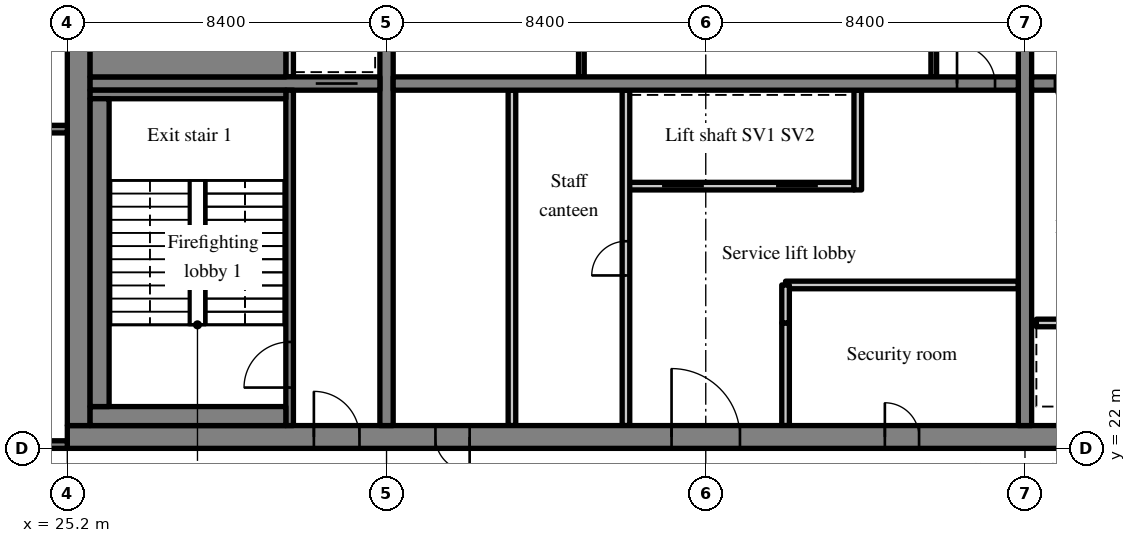
"""IFC4 building model, lengths in metres.
Left out: names, types, materials, properties, quantities, classifications, styles, units other than length and angle.
Written with IfcOpenShell. Run it as: python <this file> out.ifc"""

import sys

from ifc_helpers import new_model, si_unit, direction, frame, frame_2d, origin, place, context, subcontext, project, spatial, rectangle, extrude, source, transform, mapped, element, fill, save


model = new_model("IFC4")
c1 = context("Model", 3, precision=1e-05, world=origin(), true_north=direction((0.0, 1.0)))
c2 = subcontext(c1, "Body", "Model", "MODEL_VIEW")
j1 = project(units=[si_unit("LENGTHUNIT", "METRE"), si_unit("PLANEANGLEUNIT", "RADIAN")], contexts=[c1])
p1 = place(None, origin())
s1 = spatial("IfcSite", under=j1, at=p1, CompositionType="ELEMENT")
p2 = place(p1, origin())
s2 = spatial("IfcBuilding", under=s1, at=p2, CompositionType="ELEMENT")
p3 = place(p2, frame((0.0, 0.0, 214.0)))
s3 = spatial("IfcBuildingStorey", under=s2, at=p3, CompositionType="ELEMENT", Elevation=214.0)
m1 = source(origin(), c2, "Body", "SweptSolid", [
    extrude(rectangle(XDim=50.4, YDim=0.6, at=frame_2d((25.2, 0.0))), origin(), (0.0, 0.0, 1.0), 3.62),
])
p4 = place(p3, frame((25.2, 22.3, 0.0), z_axis=(0.0, 0.0, 1.0), x_axis=(1.0, 0.0, 0.0)))
e1 = element("IfcWall", 1, at=p4, inside=s3, PredefinedType="SHEAR", context=c2, shape_type="MappedRepresentation", body=[
    mapped(m1, transform((0.0, 0.0, 0.0), scale=1.0)),
])
m2 = source(origin(), c2, "Body", "SweptSolid", [
    extrude(rectangle(XDim=1.8, YDim=2.1, at=frame_2d((0.9, 1.05))), frame((0.0, 0.31, 0.0), z_axis=(0.0, -1.0, 0.0), x_axis=(1.0, 0.0, 0.0)), (0.0, 0.0, 1.0), 0.62),
])
p5 = place(p4, frame((15.9, 0.0, 0.0)))
e2 = element("IfcOpeningElement", 2, at=p5, cuts=e1, PredefinedType="OPENING", context=c2, shape_type="MappedRepresentation", body=[
    mapped(m2, transform((0.0, 0.0, 0.0), scale=1.0)),
])
m3 = source(origin(), c2, "Body", "SweptSolid", [
    extrude(rectangle(XDim=0.9, YDim=2.1, at=frame_2d((0.45, 1.05))), frame((0.0, 0.31, 0.0), z_axis=(0.0, -1.0, 0.0), x_axis=(1.0, 0.0, 0.0)), (0.0, 0.0, 1.0), 0.62),
])
p6 = place(p4, frame((9.687, 0.0, 0.0)))
e3 = element("IfcOpeningElement", 3, at=p6, cuts=e1, PredefinedType="OPENING", context=c2, shape_type="MappedRepresentation", body=[
    mapped(m3, transform((0.0, 0.0, 0.0), scale=1.0)),
])
p7 = place(p4, frame((21.513, 0.0, 0.0)))
e4 = element("IfcOpeningElement", 4, at=p7, cuts=e1, PredefinedType="OPENING", context=c2, shape_type="MappedRepresentation", body=[
    mapped(m3, transform((0.0, 0.0, 0.0), scale=1.0)),
])
p8 = place(p4, frame((32.7, 0.0, 0.0)))
e5 = element("IfcOpeningElement", 5, at=p8, cuts=e1, PredefinedType="OPENING", context=c2, shape_type="MappedRepresentation", body=[
    mapped(m2, transform((0.0, 0.0, 0.0), scale=1.0)),
])
m4 = source(origin(), c2, "Body", "SweptSolid", [
    extrude(rectangle(XDim=1.2, YDim=2.1, at=frame_2d((0.6, 1.05))), frame((0.0, 0.31, 0.0), z_axis=(0.0, -1.0, 0.0), x_axis=(1.0, 0.0, 0.0)), (0.0, 0.0, 1.0), 0.62),
])
p9 = place(p4, frame((6.488, 0.0, 0.0)))
e6 = element("IfcOpeningElement", 6, at=p9, cuts=e1, PredefinedType="OPENING", context=c2, shape_type="MappedRepresentation", body=[
    mapped(m4, transform((0.0, 0.0, 0.0), scale=1.0)),
])
p10 = place(p4, frame((47.925, 0.0, 0.0)))
e7 = element("IfcOpeningElement", 7, at=p10, cuts=e1, PredefinedType="OPENING", context=c2, shape_type="MappedRepresentation", body=[
    mapped(m4, transform((0.0, 0.0, 0.0), scale=1.0)),
])
m5 = source(origin(), c2, "Body", "SweptSolid", [
    extrude(rectangle(XDim=18.8, YDim=0.6, at=frame_2d((9.4, 0.0))), origin(), (0.0, 0.0, 1.0), 3.62),
])
p11 = place(p3, frame((25.5, 22.6, 0.0), z_axis=(0.0, 0.0, 1.0), x_axis=(0.0, 1.0, 0.0)))
e8 = element("IfcWall", 8, at=p11, inside=s3, PredefinedType="SHEAR", context=c2, shape_type="MappedRepresentation", body=[
    mapped(m5, transform((0.0, 0.0, 0.0), scale=1.0)),
])
m6 = source(origin(), c2, "Body", "SweptSolid", [
    extrude(rectangle(XDim=18.8, YDim=0.35, at=frame_2d((9.4, 0.0))), origin(), (0.0, 0.0, 1.0), 3.62),
])
p12 = place(p3, frame((33.6, 22.6, 0.0), z_axis=(0.0, 0.0, 1.0), x_axis=(0.0, 1.0, 0.0)))
e9 = element("IfcWall", 9, at=p12, inside=s3, PredefinedType="SHEAR", context=c2, shape_type="MappedRepresentation", body=[
    mapped(m6, transform((0.0, 0.0, 0.0), scale=1.0)),
])
m7 = source(origin(), c2, "Body", "SweptSolid", [
    extrude(rectangle(XDim=1.1, YDim=2.1, at=frame_2d((0.55, 1.05))), frame((0.0, 0.185, 0.0), z_axis=(0.0, -1.0, 0.0), x_axis=(1.0, 0.0, 0.0)), (0.0, 0.0, 1.0), 0.37),
])
p13 = place(p12, frame((12.85, 0.0, 0.0)))
e10 = element("IfcOpeningElement", 10, at=p13, cuts=e9, PredefinedType="OPENING", context=c2, shape_type="MappedRepresentation", body=[
    mapped(m7, transform((0.0, 0.0, 0.0), scale=1.0)),
])
p14 = place(p3, frame((50.4, 22.6, 0.0), z_axis=(0.0, 0.0, 1.0), x_axis=(0.0, 1.0, 0.0)))
e11 = element("IfcWall", 11, at=p14, inside=s3, PredefinedType="SHEAR", context=c2, shape_type="MappedRepresentation", body=[
    mapped(m6, transform((0.0, 0.0, 0.0), scale=1.0)),
])
p15 = place(p14, frame((12.85, 0.0, 0.0)))
e12 = element("IfcOpeningElement", 12, at=p15, cuts=e11, PredefinedType="OPENING", context=c2, shape_type="MappedRepresentation", body=[
    mapped(m7, transform((0.0, 0.0, 0.0), scale=1.0)),
])
m8 = source(origin(), c2, "Body", "SweptSolid", [
    extrude(rectangle(XDim=7.625, YDim=0.35, at=frame_2d((3.812, 0.0))), origin(), (0.0, 0.0, 1.0), 3.62),
])
p16 = place(p3, frame((25.8, 31.6, 0.0), z_axis=(0.0, 0.0, 1.0), x_axis=(1.0, 0.0, 0.0)))
e13 = element("IfcWall", 13, at=p16, inside=s3, PredefinedType="SHEAR", context=c2, shape_type="MappedRepresentation", body=[
    mapped(m8, transform((0.0, 0.0, 0.0), scale=1.0)),
])
p17 = place(p16, frame((5.938, 0.0, 0.0)))
e14 = element("IfcOpeningElement", 14, at=p17, cuts=e13, PredefinedType="OPENING", context=c2, shape_type="MappedRepresentation", body=[
    mapped(m7, transform((0.0, 0.0, 0.0), scale=1.0)),
])
m9 = source(origin(), c2, "Body", "SweptSolid", [
    extrude(rectangle(XDim=16.45, YDim=0.35, at=frame_2d((8.225, 0.0))), origin(), (0.0, 0.0, 1.0), 3.62),
])
p18 = place(p3, frame((33.775, 31.6, 0.0), z_axis=(0.0, 0.0, 1.0), x_axis=(1.0, 0.0, 0.0)))
e15 = element("IfcWall", 15, at=p18, inside=s3, PredefinedType="SHEAR", context=c2, shape_type="MappedRepresentation", body=[
    mapped(m9, transform((0.0, 0.0, 0.0), scale=1.0)),
])
m10 = source(origin(), c2, "Body", "SweptSolid", [
    extrude(rectangle(XDim=1.0, YDim=2.1, at=frame_2d((0.5, 1.05))), frame((0.0, 0.185, 0.0), z_axis=(0.0, -1.0, 0.0), x_axis=(1.0, 0.0, 0.0)), (0.0, 0.0, 1.0), 0.37),
])
p19 = place(p18, frame((14.837, 0.0, 0.0)))
e16 = element("IfcOpeningElement", 16, at=p19, cuts=e15, PredefinedType="OPENING", context=c2, shape_type="MappedRepresentation", body=[
    mapped(m10, transform((0.0, 0.0, 0.0), scale=1.0)),
])
m11 = source(origin(), c2, "Body", "SweptSolid", [
    extrude(rectangle(XDim=16.45, YDim=0.35, at=frame_2d((8.225, 0.0))), origin(), (0.0, 0.0, 1.0), 3.62),
])
p20 = place(p3, frame((50.575, 31.6, 0.0), z_axis=(0.0, 0.0, 1.0), x_axis=(1.0, 0.0, 0.0)))
e17 = element("IfcWall", 17, at=p20, inside=s3, PredefinedType="SHEAR", context=c2, shape_type="MappedRepresentation", body=[
    mapped(m11, transform((0.0, 0.0, 0.0), scale=1.0)),
])
p21 = place(p20, frame((0.613, 0.0, 0.0)))
e18 = element("IfcOpeningElement", 18, at=p21, cuts=e17, PredefinedType="OPENING", context=c2, shape_type="MappedRepresentation", body=[
    mapped(m10, transform((0.0, 0.0, 0.0), scale=1.0)),
])
m12 = source(origin(), c2, "Body", "SweptSolid", [
    extrude(rectangle(XDim=6.0, YDim=0.2, at=frame_2d((3.0, 0.0))), origin(), (0.0, 0.0, 1.0), 3.62),
])
p22 = place(p3, frame((39.9, 28.9, 0.0), z_axis=(0.0, 0.0, 1.0), x_axis=(1.0, 0.0, 0.0)))
e19 = element("IfcWall", 19, at=p22, inside=s3, PredefinedType="SOLIDWALL", context=c2, shape_type="MappedRepresentation", body=[
    mapped(m12, transform((0.0, 0.0, 0.0), scale=1.0)),
])
m13 = source(origin(), c2, "Body", "SweptSolid", [
    extrude(rectangle(XDim=1.1, YDim=2.1, at=frame_2d((0.55, 1.05))), frame((0.0, 0.11, 0.0), z_axis=(0.0, -1.0, 0.0), x_axis=(1.0, 0.0, 0.0)), (0.0, 0.0, 1.0), 0.22),
])
p23 = place(p22, frame((0.95, 0.0, 0.0)))
e20 = element("IfcOpeningElement", 20, at=p23, cuts=e19, PredefinedType="OPENING", context=c2, shape_type="MappedRepresentation", body=[
    mapped(m13, transform((0.0, 0.0, 0.0), scale=1.0)),
])
p24 = place(p22, frame((3.95, 0.0, 0.0)))
e21 = element("IfcOpeningElement", 21, at=p24, cuts=e19, PredefinedType="OPENING", context=c2, shape_type="MappedRepresentation", body=[
    mapped(m13, transform((0.0, 0.0, 0.0), scale=1.0)),
])
m14 = source(origin(), c2, "Body", "SweptSolid", [
    extrude(rectangle(XDim=8.825, YDim=0.2, at=frame_2d((4.413, 0.0))), origin(), (0.0, 0.0, 1.0), 3.62),
])
p25 = place(p3, frame((39.9, 22.6, 0.0), z_axis=(0.0, 0.0, 1.0), x_axis=(0.0, 1.0, 0.0)))
e22 = element("IfcWall", 22, at=p25, inside=s3, PredefinedType="PARTITIONING", context=c2, shape_type="MappedRepresentation", body=[
    mapped(m14, transform((0.0, 0.0, 0.0), scale=1.0)),
])
m15 = source(origin(), c2, "Body", "SweptSolid", [
    extrude(rectangle(XDim=0.9, YDim=2.1, at=frame_2d((0.45, 1.05))), frame((0.0, 0.11, 0.0), z_axis=(0.0, -1.0, 0.0), x_axis=(1.0, 0.0, 0.0)), (0.0, 0.0, 1.0), 0.22),
])
p26 = place(p25, frame((3.95, 0.0, 0.0)))
e23 = element("IfcOpeningElement", 23, at=p26, cuts=e22, PredefinedType="OPENING", context=c2, shape_type="MappedRepresentation", body=[
    mapped(m15, transform((0.0, 0.0, 0.0), scale=1.0)),
])
m16 = source(origin(), c2, "Body", "SweptSolid", [
    extrude(rectangle(XDim=2.7, YDim=0.2, at=frame_2d((1.35, 0.0))), origin(), (0.0, 0.0, 1.0), 3.62),
])
p27 = place(p3, frame((44.1, 22.6, 0.0), z_axis=(0.0, 0.0, 1.0), x_axis=(0.0, 1.0, 0.0)))
e24 = element("IfcWall", 24, at=p27, inside=s3, PredefinedType="PARTITIONING", context=c2, shape_type="MappedRepresentation", body=[
    mapped(m16, transform((0.0, 0.0, 0.0), scale=1.0)),
])
m17 = source(origin(), c2, "Body", "SweptSolid", [
    extrude(rectangle(XDim=2.625, YDim=0.2, at=frame_2d((1.312, 0.0))), origin(), (0.0, 0.0, 1.0), 3.62),
])
p28 = place(p3, frame((46.0, 28.8, 0.0), z_axis=(0.0, 0.0, 1.0), x_axis=(0.0, 1.0, 0.0)))
e25 = element("IfcWall", 25, at=p28, inside=s3, PredefinedType="SOLIDWALL", context=c2, shape_type="MappedRepresentation", body=[
    mapped(m17, transform((0.0, 0.0, 0.0), scale=1.0)),
])
p29 = place(p3, frame((36.9, 22.6, 0.0), z_axis=(0.0, 0.0, 1.0), x_axis=(0.0, 1.0, 0.0)))
e26 = element("IfcWall", 26, at=p29, inside=s3, PredefinedType="PARTITIONING", context=c2, shape_type="MappedRepresentation", body=[
    mapped(m14, transform((0.0, 0.0, 0.0), scale=1.0)),
])
m18 = source(origin(), c2, "Body", "SweptSolid", [
    extrude(rectangle(XDim=6.125, YDim=0.2, at=frame_2d((3.062, 0.0))), origin(), (0.0, 0.0, 1.0), 3.62),
])
p30 = place(p3, frame((44.1, 26.3, 0.0), z_axis=(0.0, 0.0, 1.0), x_axis=(1.0, 0.0, 0.0)))
e27 = element("IfcWall", 27, at=p30, inside=s3, PredefinedType="PARTITIONING", context=c2, shape_type="MappedRepresentation", body=[
    mapped(m18, transform((0.0, 0.0, 0.0), scale=1.0)),
])
m19 = source(origin(), c2, "Body", "SweptSolid", [
    extrude(rectangle(XDim=1.0, YDim=0.2, at=frame_2d((0.5, 0.0))), origin(), (0.0, 0.0, 1.0), 3.62),
])
p31 = place(p3, frame((44.1, 25.3, 0.0), z_axis=(0.0, 0.0, 1.0), x_axis=(0.0, 1.0, 0.0)))
e28 = element("IfcWall", 28, at=p31, inside=s3, PredefinedType="PARTITIONING", context=c2, shape_type="MappedRepresentation", body=[
    mapped(m19, transform((0.0, 0.0, 0.0), scale=1.0)),
])
m20 = source(origin(), c2, "Body", "SweptSolid", [
    extrude(rectangle(XDim=3.225, YDim=0.15, at=frame_2d((1.613, 0.0))), origin(), (0.0, 0.0, 1.0), 3.62),
])
for number, where, z_axis, x_axis in (
    (29, (48.0, 31.775, 0.0), (0.0, 0.0, 1.0), (0.0, 1.0, 0.0)),
    (30, (38.727, 31.775, 0.0), (0.0, 0.0, 1.0), (0.0, 1.0, 0.0)),
):
    element("IfcWall", number, at=place(p3, frame(where, z_axis=z_axis, x_axis=x_axis)), inside=s3, PredefinedType="PARTITIONING", context=c2, shape_type="MappedRepresentation", body=[
        mapped(m20, transform((0.0, 0.0, 0.0), scale=1.0)),
    ])
p32 = place(p3, frame((56.7, 25.3, 0.0), z_axis=(0.0, 0.0, 1.0), x_axis=(-1.0, 0.0, 0.0)))
e31 = element("IfcWall", 31, at=p32, inside=s3, PredefinedType="SOLIDWALL", context=c2, shape_type="MappedRepresentation", body=[
    mapped(m12, transform((0.0, 0.0, 0.0), scale=1.0)),
])
p33 = place(p32, frame((0.95, 0.0, 0.0)))
e32 = element("IfcOpeningElement", 32, at=p33, cuts=e31, PredefinedType="OPENING", context=c2, shape_type="MappedRepresentation", body=[
    mapped(m13, transform((0.0, 0.0, 0.0), scale=1.0)),
])
p34 = place(p32, frame((3.95, 0.0, 0.0)))
e33 = element("IfcOpeningElement", 33, at=p34, cuts=e31, PredefinedType="OPENING", context=c2, shape_type="MappedRepresentation", body=[
    mapped(m13, transform((0.0, 0.0, 0.0), scale=1.0)),
])
m21 = source(origin(), c2, "Body", "SweptSolid", [
    extrude(rectangle(XDim=8.825, YDim=0.2, at=frame_2d((4.413, 0.0))), origin(), (0.0, 0.0, 1.0), 3.62),
])
p35 = place(p3, frame((31.05, 22.6, 0.0), z_axis=(0.0, 0.0, 1.0), x_axis=(0.0, 1.0, 0.0)))
e34 = element("IfcWall", 34, at=p35, inside=s3, PredefinedType="SOLIDWALL", context=c2, shape_type="MappedRepresentation", body=[
    mapped(m21, transform((0.0, 0.0, 0.0), scale=1.0)),
])
m22 = source(origin(), c2, "Body", "SweptSolid", [
    extrude(rectangle(XDim=1.2, YDim=2.1, at=frame_2d((0.6, 1.05))), frame((0.0, 0.11, 0.0), z_axis=(0.0, -1.0, 0.0), x_axis=(1.0, 0.0, 0.0)), (0.0, 0.0, 1.0), 0.22),
])
p36 = place(p35, frame((1.0, 0.0, 0.0)))
e35 = element("IfcOpeningElement", 35, at=p36, cuts=e34, PredefinedType="OPENING", context=c2, shape_type="MappedRepresentation", body=[
    mapped(m22, transform((0.0, 0.0, 0.0), scale=1.0)),
])
m23 = source(origin(), c2, "Body", "SweptSolid", [
    extrude(rectangle(XDim=1.825, YDim=0.2, at=frame_2d((0.913, 0.0))), origin(), (0.0, 0.0, 1.0), 3.62),
])
p37 = place(p3, frame((31.05, 31.775, 0.0), z_axis=(0.0, 0.0, 1.0), x_axis=(0.0, 1.0, 0.0)))
e36 = element("IfcWall", 36, at=p37, inside=s3, PredefinedType="SOLIDWALL", context=c2, shape_type="MappedRepresentation", body=[
    mapped(m23, transform((0.0, 0.0, 0.0), scale=1.0)),
])
m24 = source(origin(), c2, "Body", "SweptSolid", [
    extrude(rectangle(XDim=8.1, YDim=0.2, at=frame_2d((4.05, 0.0))), origin(), (0.0, 0.0, 1.0), 3.62),
])
p38 = place(p3, frame((17.1, 22.1, 0.0), z_axis=(0.0, 0.0, 1.0), x_axis=(1.0, 0.0, 0.0)))
e37 = element("IfcWall", 37, at=p38, inside=s3, PredefinedType="SOLIDWALL", context=c2, shape_type="MappedRepresentation", body=[
    mapped(m24, transform((0.0, 0.0, 0.0), scale=1.0)),
])
p39 = place(p38, frame((5.9, 0.0, 0.0)))
e38 = element("IfcOpeningElement", 38, at=p39, cuts=e37, PredefinedType="OPENING", context=c2, shape_type="MappedRepresentation", body=[
    mapped(m22, transform((0.0, 0.0, 0.0), scale=1.0)),
])
p40 = place(p3, frame((17.1, 30.4, 0.0), z_axis=(0.0, 0.0, 1.0), x_axis=(1.0, 0.0, 0.0)))
e39 = element("IfcWall", 39, at=p40, inside=s3, PredefinedType="SOLIDWALL", context=c2, shape_type="MappedRepresentation", body=[
    mapped(m24, transform((0.0, 0.0, 0.0), scale=1.0)),
])
m25 = source(origin(), c2, "Body", "SweptSolid", [
    extrude(rectangle(XDim=1.0, YDim=2.1, at=frame_2d((0.5, 1.05))), frame((0.0, 0.11, 0.0), z_axis=(0.0, -1.0, 0.0), x_axis=(1.0, 0.0, 0.0)), (0.0, 0.0, 1.0), 0.22),
])
p41 = place(p40, frame((6.0, 0.0, 0.0)))
e40 = element("IfcOpeningElement", 40, at=p41, cuts=e39, PredefinedType="OPENING", context=c2, shape_type="MappedRepresentation", body=[
    mapped(m25, transform((0.0, 0.0, 0.0), scale=1.0)),
])
m26 = source(origin(), c2, "Body", "SweptSolid", [
    extrude(rectangle(XDim=5.15, YDim=0.5, at=frame_2d((2.575, 0.0))), origin(), (0.0, 0.0, 1.0), 3.62),
])
p42 = place(p3, frame((25.8, 22.85, 0.0), z_axis=(0.0, 0.0, 1.0), x_axis=(1.0, 0.0, 0.0)))
e41 = element("IfcWall", 41, at=p42, inside=s3, PredefinedType="SOLIDWALL", context=c2, shape_type="MappedRepresentation", body=[
    mapped(m26, transform((0.0, 0.0, 0.0), scale=1.0)),
])
m27 = source(origin(), c2, "Body", "SweptSolid", [
    extrude(rectangle(XDim=5.15, YDim=0.225, at=frame_2d((2.575, 0.0))), origin(), (0.0, 0.0, 1.0), 3.62),
])
p43 = place(p3, frame((25.8, 31.312, 0.0), z_axis=(0.0, 0.0, 1.0), x_axis=(1.0, 0.0, 0.0)))
e42 = element("IfcWall", 42, at=p43, inside=s3, PredefinedType="SOLIDWALL", context=c2, shape_type="MappedRepresentation", body=[
    mapped(m27, transform((0.0, 0.0, 0.0), scale=1.0)),
])
m28 = source(origin(), c2, "Body", "SweptSolid", [
    extrude(rectangle(XDim=8.1, YDim=0.5, at=frame_2d((4.05, 0.0))), origin(), (0.0, 0.0, 1.0), 3.62),
])
p44 = place(p3, frame((26.05, 23.1, 0.0), z_axis=(0.0, 0.0, 1.0), x_axis=(0.0, 1.0, 0.0)))
e43 = element("IfcWall", 43, at=p44, inside=s3, PredefinedType="SOLIDWALL", context=c2, shape_type="MappedRepresentation", body=[
    mapped(m28, transform((0.0, 0.0, 0.0), scale=1.0)),
])
m29 = source(origin(), c2, "Body", "SweptSolid", [
    extrude(rectangle(XDim=5.15, YDim=1.025, at=frame_2d((2.575, 0.0))), origin(), (0.0, 0.0, 1.0), 3.62),
])
p45 = place(p3, frame((25.8, 32.287, 0.0), z_axis=(0.0, 0.0, 1.0), x_axis=(1.0, 0.0, 0.0)))
e44 = element("IfcWall", 44, at=p45, inside=s3, PredefinedType="SOLIDWALL", context=c2, shape_type="MappedRepresentation", body=[
    mapped(m29, transform((0.0, 0.0, 0.0), scale=1.0)),
])
m30 = source(origin(), c2, "Body", "SweptSolid", [
    extrude(rectangle(XDim=1.8, YDim=2.1, at=frame_2d((0.9, 1.05))), frame((0.0, 0.225, 0.0), z_axis=(0.0, -1.0, 0.0), x_axis=(1.0, 0.0, 0.0)), (0.0, 0.0, 1.0), 0.05),
])
p46 = place(p5, origin())
e45 = element("IfcDoor", 45, at=p46, inside=s3, OperationType="DOUBLE_DOOR_SINGLE_SWING", PredefinedType="DOOR", context=c2, shape_type="MappedRepresentation", body=[
    mapped(m30, transform((0.0, 0.0, 0.0), scale=1.0)),
])
fill(e2, e45)
m31 = source(origin(), c2, "Body", "SweptSolid", [
    extrude(rectangle(XDim=1.0, YDim=2.1, at=frame_2d((0.5, 1.05))), frame((0.0, 0.025, 0.0), z_axis=(0.0, -1.0, 0.0), x_axis=(1.0, 0.0, 0.0)), (0.0, 0.0, 1.0), 0.05),
])
p47 = place(p19, origin())
e46 = element("IfcDoor", 46, at=p47, inside=s3, OperationType="SINGLE_SWING_LEFT", PredefinedType="DOOR", context=c2, shape_type="MappedRepresentation", body=[
    mapped(m31, transform((0.0, 0.0, 0.0), scale=1.0)),
])
fill(e16, e46)
m32 = source(origin(), c2, "Body", "SweptSolid", [
    extrude(rectangle(XDim=1.1, YDim=2.1, at=frame_2d((0.55, 1.05))), frame((0.0, 0.025, 0.0), z_axis=(0.0, -1.0, 0.0), x_axis=(1.0, 0.0, 0.0)), (0.0, 0.0, 1.0), 0.05),
])
p48 = place(p23, origin())
e47 = element("IfcDoor", 47, at=p48, inside=s3, OperationType="SLIDING_TO_LEFT", PredefinedType="DOOR", context=c2, shape_type="MappedRepresentation", body=[
    mapped(m32, transform((0.0, 0.0, 0.0), scale=1.0)),
])
fill(e20, e47)
p49 = place(p24, origin())
e48 = element("IfcDoor", 48, at=p49, inside=s3, OperationType="SLIDING_TO_RIGHT", PredefinedType="DOOR", context=c2, shape_type="MappedRepresentation", body=[
    mapped(m32, transform((0.0, 0.0, 0.0), scale=1.0)),
])
fill(e21, e48)
m33 = source(origin(), c2, "Body", "SweptSolid", [
    extrude(rectangle(XDim=0.9, YDim=2.1, at=frame_2d((0.45, 1.05))), frame((0.0, 0.225, 0.0), z_axis=(0.0, -1.0, 0.0), x_axis=(1.0, 0.0, 0.0)), (0.0, 0.0, 1.0), 0.05),
])
p50 = place(p6, origin())
e49 = element("IfcDoor", 49, at=p50, inside=s3, OperationType="SINGLE_SWING_RIGHT", PredefinedType="DOOR", context=c2, shape_type="MappedRepresentation", body=[
    mapped(m33, transform((0.0, 0.0, 0.0), scale=1.0)),
])
fill(e3, e49)
m34 = source(origin(), c2, "Body", "SweptSolid", [
    extrude(rectangle(XDim=0.9, YDim=2.1, at=frame_2d((0.45, 1.05))), frame((0.0, 0.025, 0.0), z_axis=(0.0, -1.0, 0.0), x_axis=(1.0, 0.0, 0.0)), (0.0, 0.0, 1.0), 0.05),
])
p51 = place(p26, origin())
e50 = element("IfcDoor", 50, at=p51, inside=s3, OperationType="SINGLE_SWING_LEFT", PredefinedType="DOOR", context=c2, shape_type="MappedRepresentation", body=[
    mapped(m34, transform((0.0, 0.0, 0.0), scale=1.0)),
])
fill(e23, e50)
p52 = place(p7, origin())
e51 = element("IfcDoor", 51, at=p52, inside=s3, OperationType="SINGLE_SWING_LEFT", PredefinedType="DOOR", context=c2, shape_type="MappedRepresentation", body=[
    mapped(m33, transform((0.0, 0.0, 0.0), scale=1.0)),
])
fill(e4, e51)
p53 = place(p21, origin())
e52 = element("IfcDoor", 52, at=p53, inside=s3, OperationType="SINGLE_SWING_RIGHT", PredefinedType="DOOR", context=c2, shape_type="MappedRepresentation", body=[
    mapped(m31, transform((0.0, 0.0, 0.0), scale=1.0)),
])
fill(e18, e52)
m35 = source(origin(), c2, "Body", "SweptSolid", [
    extrude(rectangle(XDim=1.2, YDim=2.1, at=frame_2d((0.6, 1.05))), frame((0.0, 0.025, 0.0), z_axis=(0.0, -1.0, 0.0), x_axis=(1.0, 0.0, 0.0)), (0.0, 0.0, 1.0), 0.05),
])
p54 = place(p36, origin())
e53 = element("IfcDoor", 53, at=p54, inside=s3, OperationType="SINGLE_SWING_LEFT", PredefinedType="DOOR", context=c2, shape_type="MappedRepresentation", body=[
    mapped(m35, transform((0.0, 0.0, 0.0), scale=1.0)),
])
fill(e35, e53)
m36 = source(origin(), c2, "Body", "SweptSolid", [
    extrude(rectangle(XDim=1.2, YDim=2.1, at=frame_2d((0.6, 1.05))), frame((0.0, 0.225, 0.0), z_axis=(0.0, -1.0, 0.0), x_axis=(1.0, 0.0, 0.0)), (0.0, 0.0, 1.0), 0.05),
])
p55 = place(p9, origin())
e54 = element("IfcDoor", 54, at=p55, inside=s3, OperationType="SINGLE_SWING_LEFT", PredefinedType="DOOR", context=c2, shape_type="MappedRepresentation", body=[
    mapped(m36, transform((0.0, 0.0, 0.0), scale=1.0)),
])
fill(e6, e54)
p56 = place(p17, origin())
e55 = element("IfcDoor", 55, at=p56, inside=s3, OperationType="SLIDING_TO_LEFT", PredefinedType="DOOR", context=c2, shape_type="MappedRepresentation", body=[
    mapped(m32, transform((0.0, 0.0, 0.0), scale=1.0)),
])
fill(e14, e55)
save(model, sys.argv[1])
